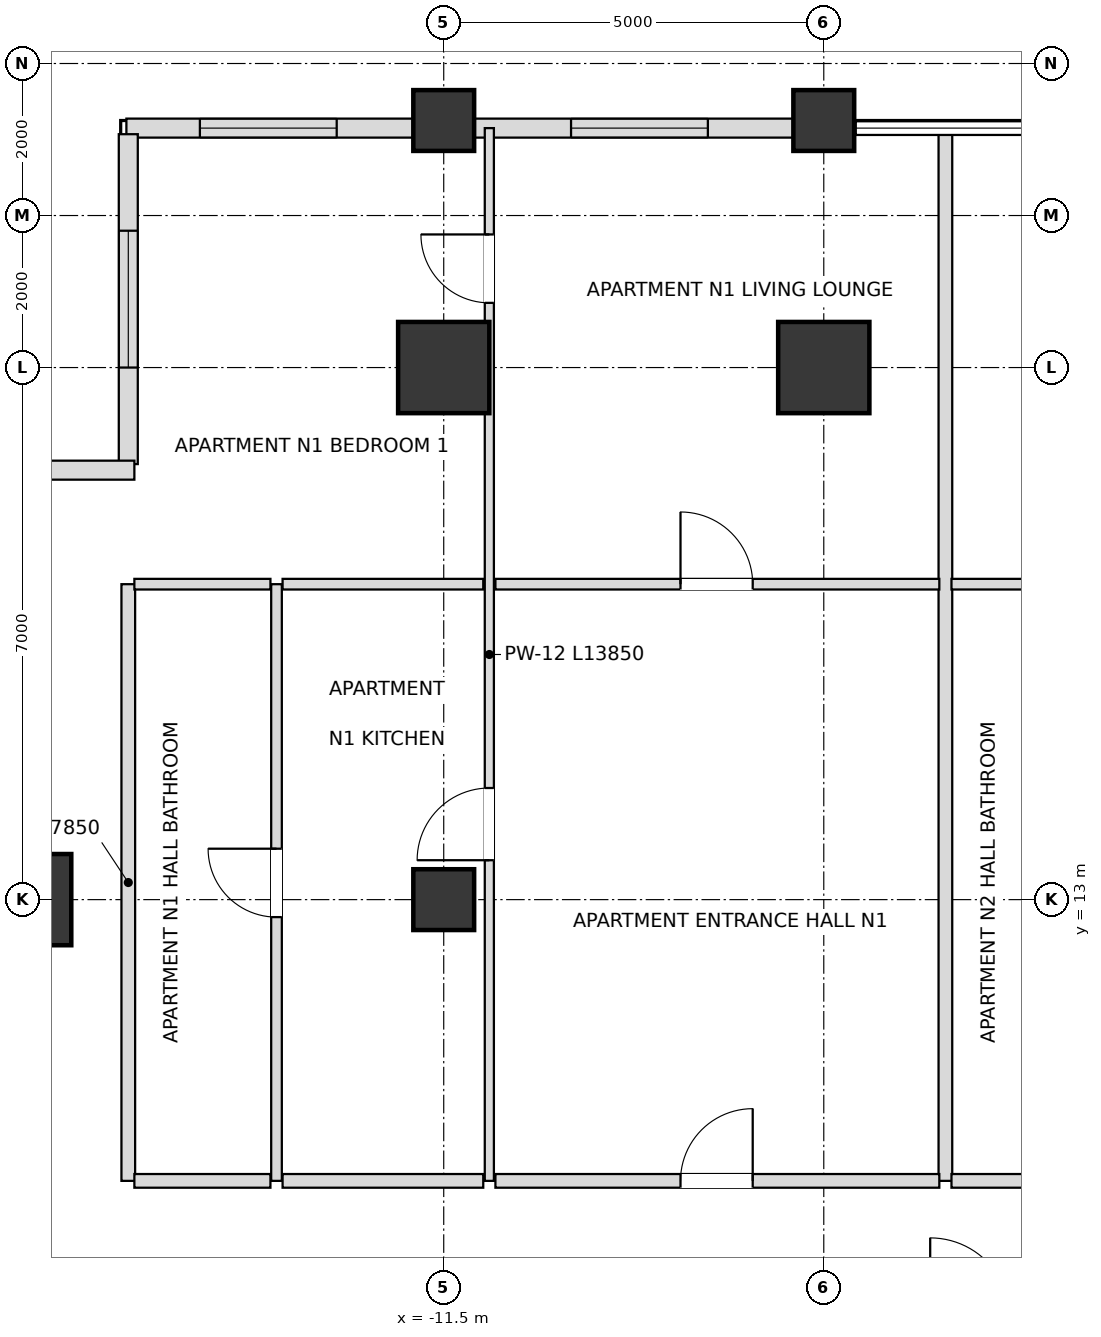
"""IFC4 building model, lengths in metres.
Left out: names, types, materials, properties, quantities, classifications, styles, units other than length and angle.
Written with IfcOpenShell. Run it as: python <this file> out.ifc"""

import sys

from ifc_helpers import new_model, si_unit, direction, frame, frame_2d, origin, origin_2d, place, context, subcontext, project, spatial, rectangle, extrude, element, fill, save


model = new_model("IFC4")
c1 = context("Model", 3, precision=1e-05, world=origin(), true_north=direction((0.0, 1.0)))
c2 = subcontext(c1, "Body", "Model", "MODEL_VIEW")
j1 = project(units=[si_unit("LENGTHUNIT", "METRE"), si_unit("PLANEANGLEUNIT", "RADIAN")], contexts=[c1])
p1 = place(None, origin())
s1 = spatial("IfcSite", under=j1, at=p1, CompositionType="ELEMENT")
p2 = place(p1, origin())
s2 = spatial("IfcBuilding", under=s1, at=p2, CompositionType="ELEMENT")
p3 = place(p2, frame((0.0, 0.0, 102.6)))
s3 = spatial("IfcBuildingStorey", under=s2, at=p3, CompositionType="ELEMENT", Elevation=102.6)
for number, where, z_axis, x_axis in (
    (1, (-6.5, 20.0, 0.0), (0.0, 0.0, 1.0), (1.0, 0.0, 0.0)),
    (2, (-11.5, 20.0, 0.0), (0.0, 0.0, 1.0), (1.0, 0.0, 0.0)),
    (3, (-17.0, 13.0, 0.0), (0.0, 0.0, 1.0), (1.0, 0.0, 0.0)),
):
    element("IfcColumn", number, at=place(p3, frame(where, z_axis=z_axis, x_axis=x_axis)), inside=s3, PredefinedType="USERDEFINED", context=c2, shape_type="SweptSolid", body=[
        extrude(rectangle(XDim=1.2, YDim=1.2, at=origin_2d()), origin(), (0.0, 0.0, 1.0), 3.6),
    ])
for number, where, z_axis, x_axis in (
    (4, (-11.5, 13.0, 0.0), (0.0, 0.0, 1.0), (1.0, 0.0, 0.0)),
    (5, (-11.5, 23.25, 0.0), (0.0, 0.0, 1.0), (1.0, 0.0, 0.0)),
    (6, (-6.5, 23.25, 0.0), (0.0, 0.0, 1.0), (1.0, 0.0, 0.0)),
):
    element("IfcColumn", number, at=place(p3, frame(where, z_axis=z_axis, x_axis=x_axis)), inside=s3, PredefinedType="COLUMN", context=c2, shape_type="SweptSolid", body=[
        extrude(rectangle(XDim=0.8, YDim=0.8, at=origin_2d()), origin(), (0.0, 0.0, 1.0), 3.6),
    ])
p4 = place(p3, frame((-6.895, 23.15, 0.0), z_axis=(0.0, 0.0, 1.0), x_axis=(-1.0, 0.0, 0.0)))
e7 = element("IfcWall", 7, at=p4, inside=s3, PredefinedType="SOLIDWALL", context=c2, shape_type="SweptSolid", body=[
    extrude(rectangle(XDim=4.21, YDim=0.25, at=frame_2d((2.105, 0.0))), origin(), (0.0, 0.0, 1.0), 2.736),
])
p5 = place(p4, frame((1.13, 0.0, 0.72)))
e8 = element("IfcOpeningElement", 8, at=p5, cuts=e7, PredefinedType="OPENING", context=c2, shape_type="SweptSolid", body=[
    extrude(rectangle(XDim=1.8, YDim=1.68, at=frame_2d((0.9, 0.84))), frame((0.0, 0.135, 0.0), z_axis=(0.0, -1.0, 0.0), x_axis=(1.0, 0.0, 0.0)), (0.0, 0.0, 1.0), 0.27),
])
p6 = place(p3, frame((-11.895, 23.15, 0.0), z_axis=(0.0, 0.0, 1.0), x_axis=(-1.0, 0.0, 0.0)))
e9 = element("IfcWall", 9, at=p6, inside=s3, PredefinedType="SOLIDWALL", context=c2, shape_type="SweptSolid", body=[
    extrude(rectangle(XDim=3.78, YDim=0.25, at=frame_2d((1.89, 0.0))), origin(), (0.0, 0.0, 1.0), 2.736),
])
p7 = place(p6, frame((1.013, 0.0, 0.72)))
e10 = element("IfcOpeningElement", 10, at=p7, cuts=e9, PredefinedType="OPENING", context=c2, shape_type="SweptSolid", body=[
    extrude(rectangle(XDim=1.8, YDim=1.68, at=frame_2d((0.9, 0.84))), frame((0.0, 0.135, 0.0), z_axis=(0.0, -1.0, 0.0), x_axis=(1.0, 0.0, 0.0)), (0.0, 0.0, 1.0), 0.27),
])
p8 = place(p3, frame((-15.65, 23.07, 0.0), z_axis=(0.0, 0.0, 1.0), x_axis=(0.0, -1.0, 0.0)))
e11 = element("IfcWall", 11, at=p8, inside=s3, PredefinedType="SOLIDWALL", context=c2, shape_type="SweptSolid", body=[
    extrude(rectangle(XDim=4.34, YDim=0.25, at=frame_2d((2.17, 0.0))), origin(), (0.0, 0.0, 1.0), 2.736),
])
p9 = place(p8, frame((1.27, 0.0, 0.72)))
e12 = element("IfcOpeningElement", 12, at=p9, cuts=e11, PredefinedType="OPENING", context=c2, shape_type="SweptSolid", body=[
    extrude(rectangle(XDim=1.8, YDim=1.68, at=frame_2d((0.9, 0.84))), frame((0.0, 0.135, 0.0), z_axis=(0.0, -1.0, 0.0), x_axis=(1.0, 0.0, 0.0)), (0.0, 0.0, 1.0), 0.27),
])
p10 = place(p3, frame((-15.57, 18.65, 0.0), z_axis=(0.0, 0.0, 1.0), x_axis=(-1.0, 0.0, 0.0)))
e13 = element("IfcWall", 13, at=p10, inside=s3, PredefinedType="SOLIDWALL", context=c2, shape_type="SweptSolid", body=[
    extrude(rectangle(XDim=4.66, YDim=0.25, at=frame_2d((2.33, 0.0))), origin(), (0.0, 0.0, 1.0), 2.736),
])
p11 = place(p10, frame((1.43, 0.0, 0.72)))
e14 = element("IfcOpeningElement", 14, at=p11, cuts=e13, PredefinedType="OPENING", context=c2, shape_type="SweptSolid", body=[
    extrude(rectangle(XDim=1.8, YDim=1.68, at=frame_2d((0.9, 0.84))), frame((0.0, 0.135, 0.0), z_axis=(0.0, -1.0, 0.0), x_axis=(1.0, 0.0, 0.0)), (0.0, 0.0, 1.0), 0.27),
])
p12 = place(p3, frame((-15.65, 9.3, 0.0), z_axis=(0.0, 0.0, 1.0), x_axis=(0.0, 1.0, 0.0)))
e15 = element("IfcWall", 15, at=p12, inside=s3, PredefinedType="PARTITIONING", context=c2, shape_type="SweptSolid", body=[
    extrude(rectangle(XDim=7.85, YDim=0.18, at=frame_2d((3.925, 0.0))), origin(), (0.0, 0.0, 1.0), 2.736),
])
p13 = place(p3, frame((-13.7, 9.3, 0.0), z_axis=(0.0, 0.0, 1.0), x_axis=(0.0, 1.0, 0.0)))
e16 = element("IfcWall", 16, at=p13, inside=s3, PredefinedType="PARTITIONING", context=c2, shape_type="SweptSolid", body=[
    extrude(rectangle(XDim=7.85, YDim=0.14, at=frame_2d((3.925, 0.0))), origin(), (0.0, 0.0, 1.0), 2.736),
])
p14 = place(p13, frame((3.47, 0.0, 0.0)))
e17 = element("IfcOpeningElement", 17, at=p14, cuts=e16, PredefinedType="OPENING", context=c2, shape_type="SweptSolid", body=[
    extrude(rectangle(XDim=0.9, YDim=2.1, at=frame_2d((0.45, 1.05))), frame((0.0, 0.08, 0.0), z_axis=(0.0, -1.0, 0.0), x_axis=(1.0, 0.0, 0.0)), (0.0, 0.0, 1.0), 0.16),
])
p15 = place(p3, frame((-10.9, 9.3, 0.0), z_axis=(0.0, 0.0, 1.0), x_axis=(0.0, 1.0, 0.0)))
e18 = element("IfcWall", 18, at=p15, inside=s3, PredefinedType="PARTITIONING", context=c2, shape_type="SweptSolid", body=[
    extrude(rectangle(XDim=13.85, YDim=0.12, at=frame_2d((6.925, 0.0))), origin(), (0.0, 0.0, 1.0), 2.816),
])
p16 = place(p15, frame((4.219, 0.0, 0.0)))
e19 = element("IfcOpeningElement", 19, at=p16, cuts=e18, PredefinedType="OPENING", context=c2, shape_type="SweptSolid", body=[
    extrude(rectangle(XDim=0.95, YDim=2.1, at=frame_2d((0.475, 1.05))), frame((0.0, 0.07, 0.0), z_axis=(0.0, -1.0, 0.0), x_axis=(1.0, 0.0, 0.0)), (0.0, 0.0, 1.0), 0.14),
])
p17 = place(p15, frame((11.551, 0.0, 0.0)))
e20 = element("IfcOpeningElement", 20, at=p17, cuts=e18, PredefinedType="OPENING", context=c2, shape_type="SweptSolid", body=[
    extrude(rectangle(XDim=0.9, YDim=2.1, at=frame_2d((0.45, 1.05))), frame((0.0, 0.07, 0.0), z_axis=(0.0, -1.0, 0.0), x_axis=(1.0, 0.0, 0.0)), (0.0, 0.0, 1.0), 0.14),
])
p18 = place(p3, frame((-4.9, 9.3, 0.0), z_axis=(0.0, 0.0, 1.0), x_axis=(0.0, 1.0, 0.0)))
e21 = element("IfcWall", 21, at=p18, inside=s3, PredefinedType="PARTITIONING", context=c2, shape_type="SweptSolid", body=[
    extrude(rectangle(XDim=13.85, YDim=0.18, at=frame_2d((6.925, 0.0))), origin(), (0.0, 0.0, 1.0), 2.816),
])
p19 = place(p3, frame((-15.57, 9.3, 0.0), z_axis=(0.0, 0.0, 1.0), x_axis=(1.0, 0.0, 0.0)))
e22 = element("IfcWall", 22, at=p19, inside=s3, PredefinedType="PARTITIONING", context=c2, shape_type="SweptSolid", body=[
    extrude(rectangle(XDim=1.79, YDim=0.18, at=frame_2d((0.895, 0.0))), origin(), (0.0, 0.0, 1.0), 3.38),
])
p20 = place(p3, frame((-13.62, 9.3, 0.0), z_axis=(0.0, 0.0, 1.0), x_axis=(1.0, 0.0, 0.0)))
e23 = element("IfcWall", 23, at=p20, inside=s3, PredefinedType="PARTITIONING", context=c2, shape_type="SweptSolid", body=[
    extrude(rectangle(XDim=2.64, YDim=0.18, at=frame_2d((1.32, 0.0))), origin(), (0.0, 0.0, 1.0), 3.38),
])
p21 = place(p3, frame((-10.82, 9.3, 0.0), z_axis=(0.0, 0.0, 1.0), x_axis=(1.0, 0.0, 0.0)))
e24 = element("IfcWall", 24, at=p21, inside=s3, PredefinedType="PARTITIONING", context=c2, shape_type="SweptSolid", body=[
    extrude(rectangle(XDim=5.84, YDim=0.18, at=frame_2d((2.92, 0.0))), origin(), (0.0, 0.0, 1.0), 2.816),
])
p22 = place(p21, frame((2.435, 0.0, 0.0)))
e25 = element("IfcOpeningElement", 25, at=p22, cuts=e24, PredefinedType="OPENING", context=c2, shape_type="SweptSolid", body=[
    extrude(rectangle(XDim=0.95, YDim=2.15, at=frame_2d((0.475, 1.075))), frame((0.0, 0.1, 0.0), z_axis=(0.0, -1.0, 0.0), x_axis=(1.0, 0.0, 0.0)), (0.0, 0.0, 1.0), 0.2),
])
p23 = place(p3, frame((-4.82, 9.3, 0.0), z_axis=(0.0, 0.0, 1.0), x_axis=(1.0, 0.0, 0.0)))
e26 = element("IfcWall", 26, at=p23, inside=s3, PredefinedType="PARTITIONING", context=c2, shape_type="SweptSolid", body=[
    extrude(rectangle(XDim=1.79, YDim=0.18, at=frame_2d((0.895, 0.0))), origin(), (0.0, 0.0, 1.0), 3.38),
])
p24 = place(p3, frame((-15.57, 17.15, 0.0), z_axis=(0.0, 0.0, 1.0), x_axis=(1.0, 0.0, 0.0)))
e27 = element("IfcWall", 27, at=p24, inside=s3, PredefinedType="PARTITIONING", context=c2, shape_type="SweptSolid", body=[
    extrude(rectangle(XDim=1.79, YDim=0.14, at=frame_2d((0.895, 0.0))), origin(), (0.0, 0.0, 1.0), 2.736),
])
p25 = place(p3, frame((-13.62, 17.15, 0.0), z_axis=(0.0, 0.0, 1.0), x_axis=(1.0, 0.0, 0.0)))
e28 = element("IfcWall", 28, at=p25, inside=s3, PredefinedType="PARTITIONING", context=c2, shape_type="SweptSolid", body=[
    extrude(rectangle(XDim=2.64, YDim=0.14, at=frame_2d((1.32, 0.0))), origin(), (0.0, 0.0, 1.0), 2.736),
])
p26 = place(p3, frame((-10.82, 17.15, 0.0), z_axis=(0.0, 0.0, 1.0), x_axis=(1.0, 0.0, 0.0)))
e29 = element("IfcWall", 29, at=p26, inside=s3, PredefinedType="PARTITIONING", context=c2, shape_type="SweptSolid", body=[
    extrude(rectangle(XDim=5.84, YDim=0.14, at=frame_2d((2.92, 0.0))), origin(), (0.0, 0.0, 1.0), 2.816),
])
p27 = place(p26, frame((2.435, 0.0, 0.0)))
e30 = element("IfcOpeningElement", 30, at=p27, cuts=e29, PredefinedType="OPENING", context=c2, shape_type="SweptSolid", body=[
    extrude(rectangle(XDim=0.95, YDim=2.1, at=frame_2d((0.475, 1.05))), frame((0.0, 0.08, 0.0), z_axis=(0.0, -1.0, 0.0), x_axis=(1.0, 0.0, 0.0)), (0.0, 0.0, 1.0), 0.16),
])
p28 = place(p3, frame((-4.82, 17.15, 0.0), z_axis=(0.0, 0.0, 1.0), x_axis=(1.0, 0.0, 0.0)))
e31 = element("IfcWall", 31, at=p28, inside=s3, PredefinedType="PARTITIONING", context=c2, shape_type="SweptSolid", body=[
    extrude(rectangle(XDim=1.79, YDim=0.14, at=frame_2d((0.895, 0.0))), origin(), (0.0, 0.0, 1.0), 3.38),
])
p29 = place(p5, origin())
e32 = element("IfcWindow", 32, at=p29, inside=s3, PartitioningType="SINGLE_PANEL", PredefinedType="WINDOW", context=c2, shape_type="SweptSolid", body=[
    extrude(rectangle(XDim=1.8, YDim=1.68, at=frame_2d((0.9, 0.84))), frame((0.0, 0.03, 0.0), z_axis=(0.0, -1.0, 0.0), x_axis=(1.0, 0.0, 0.0)), (0.0, 0.0, 1.0), 0.06),
])
fill(e8, e32)
p30 = place(p7, origin())
e33 = element("IfcWindow", 33, at=p30, inside=s3, PartitioningType="SINGLE_PANEL", PredefinedType="WINDOW", context=c2, shape_type="SweptSolid", body=[
    extrude(rectangle(XDim=1.8, YDim=1.68, at=frame_2d((0.9, 0.84))), frame((0.0, 0.03, 0.0), z_axis=(0.0, -1.0, 0.0), x_axis=(1.0, 0.0, 0.0)), (0.0, 0.0, 1.0), 0.06),
])
fill(e10, e33)
p31 = place(p9, origin())
e34 = element("IfcWindow", 34, at=p31, inside=s3, PartitioningType="SINGLE_PANEL", PredefinedType="WINDOW", context=c2, shape_type="SweptSolid", body=[
    extrude(rectangle(XDim=1.8, YDim=1.68, at=frame_2d((0.9, 0.84))), frame((0.0, 0.03, 0.0), z_axis=(0.0, -1.0, 0.0), x_axis=(1.0, 0.0, 0.0)), (0.0, 0.0, 1.0), 0.06),
])
fill(e12, e34)
p32 = place(p22, origin())
e35 = element("IfcDoor", 35, at=p32, inside=s3, OperationType="SINGLE_SWING_RIGHT", PredefinedType="DOOR", context=c2, shape_type="SweptSolid", body=[
    extrude(rectangle(XDim=0.95, YDim=2.15, at=frame_2d((0.475, 1.075))), frame((0.0, 0.025, 0.0), z_axis=(0.0, -1.0, 0.0), x_axis=(1.0, 0.0, 0.0)), (0.0, 0.0, 1.0), 0.05),
])
fill(e25, e35)
p33 = place(p16, origin())
e36 = element("IfcDoor", 36, at=p33, inside=s3, OperationType="SINGLE_SWING_LEFT", PredefinedType="DOOR", context=c2, shape_type="SweptSolid", body=[
    extrude(rectangle(XDim=0.95, YDim=2.1, at=frame_2d((0.475, 1.05))), frame((0.0, 0.025, 0.0), z_axis=(0.0, -1.0, 0.0), x_axis=(1.0, 0.0, 0.0)), (0.0, 0.0, 1.0), 0.05),
])
fill(e19, e36)
p34 = place(p14, origin())
e37 = element("IfcDoor", 37, at=p34, inside=s3, OperationType="SINGLE_SWING_RIGHT", PredefinedType="DOOR", context=c2, shape_type="SweptSolid", body=[
    extrude(rectangle(XDim=0.9, YDim=2.1, at=frame_2d((0.45, 1.05))), frame((0.0, 0.025, 0.0), z_axis=(0.0, -1.0, 0.0), x_axis=(1.0, 0.0, 0.0)), (0.0, 0.0, 1.0), 0.05),
])
fill(e17, e37)
p35 = place(p27, origin())
e38 = element("IfcDoor", 38, at=p35, inside=s3, OperationType="SINGLE_SWING_LEFT", PredefinedType="DOOR", context=c2, shape_type="SweptSolid", body=[
    extrude(rectangle(XDim=0.95, YDim=2.1, at=frame_2d((0.475, 1.05))), frame((0.0, 0.025, 0.0), z_axis=(0.0, -1.0, 0.0), x_axis=(1.0, 0.0, 0.0)), (0.0, 0.0, 1.0), 0.05),
])
fill(e30, e38)
p36 = place(p17, origin())
e39 = element("IfcDoor", 39, at=p36, inside=s3, OperationType="SINGLE_SWING_RIGHT", PredefinedType="DOOR", context=c2, shape_type="SweptSolid", body=[
    extrude(rectangle(XDim=0.9, YDim=2.1, at=frame_2d((0.45, 1.05))), frame((0.0, 0.025, 0.0), z_axis=(0.0, -1.0, 0.0), x_axis=(1.0, 0.0, 0.0)), (0.0, 0.0, 1.0), 0.05),
])
fill(e20, e39)
save(model, sys.argv[1])
